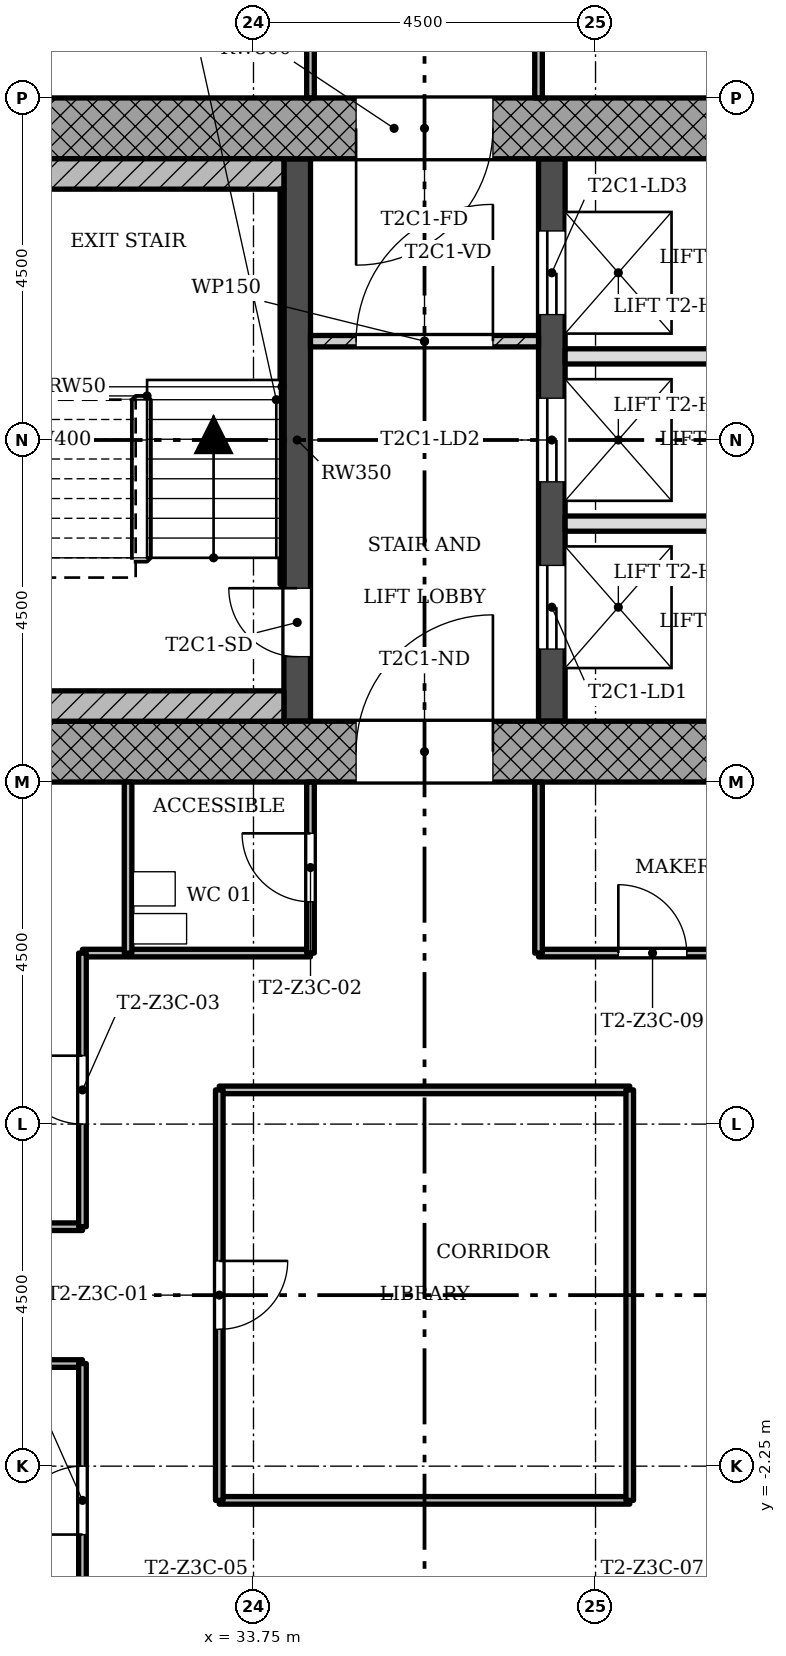
"""IFC4 building model, lengths in metres.
Left out: names, types, materials, properties, quantities, classifications, styles, units other than length and angle.
Written with IfcOpenShell. Run it as: python <this file> out.ifc"""

import sys

from ifc_helpers import new_model, si_unit, direction, frame, frame_2d, origin, place, context, subcontext, project, spatial, rectangle, extrude, element, fill, save


model = new_model("IFC4")
c1 = context("Model", 3, precision=1e-05, world=origin(), true_north=direction((0.0, 1.0)))
c2 = subcontext(c1, "Body", "Model", "MODEL_VIEW")
j1 = project(units=[si_unit("LENGTHUNIT", "METRE"), si_unit("PLANEANGLEUNIT", "RADIAN")], contexts=[c1])
p1 = place(None, origin())
s1 = spatial("IfcSite", under=j1, at=p1, CompositionType="ELEMENT")
p2 = place(p1, origin())
s2 = spatial("IfcBuilding", under=s1, at=p2, CompositionType="ELEMENT")
p3 = place(p2, frame((0.0, 0.0, 154.1)))
s3 = spatial("IfcBuildingStorey", under=s2, at=p3, CompositionType="ELEMENT", Elevation=154.1)
p4 = place(p3, frame((30.05, 7.15, 0.0), z_axis=(0.0, 0.0, 1.0), x_axis=(1.0, 0.0, 0.0)))
e1 = element("IfcWall", 1, at=p4, inside=s3, PredefinedType="SHEAR", context=c2, shape_type="SweptSolid", body=[
    extrude(rectangle(XDim=12.7, YDim=0.8, at=frame_2d((6.35, 0.0))), origin(), (0.0, 0.0, 1.0), 3.4),
])
p5 = place(p4, frame((5.05, 0.0, 0.0)))
e2 = element("IfcOpeningElement", 2, at=p5, cuts=e1, PredefinedType="OPENING", context=c2, shape_type="SweptSolid", body=[
    extrude(rectangle(XDim=1.8, YDim=2.1, at=frame_2d((0.9, 1.05))), frame((0.0, 0.41, 0.0), z_axis=(0.0, -1.0, 0.0), x_axis=(1.0, 0.0, 0.0)), (0.0, 0.0, 1.0), 0.82),
])
p6 = place(p3, frame((41.95, 15.35, 0.0), z_axis=(0.0, 0.0, 1.0), x_axis=(-1.0, 0.0, 0.0)))
e3 = element("IfcWall", 3, at=p6, inside=s3, PredefinedType="SHEAR", context=c2, shape_type="SweptSolid", body=[
    extrude(rectangle(XDim=12.7, YDim=0.8, at=frame_2d((6.35, 0.0))), origin(), (0.0, 0.0, 1.0), 3.4),
])
p7 = place(p6, frame((5.05, 0.0, 0.0)))
e4 = element("IfcOpeningElement", 4, at=p7, cuts=e3, PredefinedType="OPENING", context=c2, shape_type="SweptSolid", body=[
    extrude(rectangle(XDim=1.8, YDim=2.1, at=frame_2d((0.9, 1.05))), frame((0.0, 0.41, 0.0), z_axis=(0.0, -1.0, 0.0), x_axis=(1.0, 0.0, 0.0)), (0.0, 0.0, 1.0), 0.82),
])
p8 = place(p3, frame((34.325, 7.55, 0.0), z_axis=(0.0, 0.0, 1.0), x_axis=(0.0, 1.0, 0.0)))
e5 = element("IfcWall", 5, at=p8, inside=s3, PredefinedType="SHEAR", context=c2, shape_type="SweptSolid", body=[
    extrude(rectangle(XDim=7.4, YDim=0.35, at=frame_2d((3.7, 0.0))), origin(), (0.0, 0.0, 1.0), 3.4),
])
p9 = place(p8, frame((0.85, 0.0, 0.0)))
e6 = element("IfcOpeningElement", 6, at=p9, cuts=e5, PredefinedType="OPENING", context=c2, shape_type="SweptSolid", body=[
    extrude(rectangle(XDim=0.9, YDim=2.1, at=frame_2d((0.45, 1.05))), frame((0.0, 0.185, 0.0), z_axis=(0.0, -1.0, 0.0), x_axis=(1.0, 0.0, 0.0)), (0.0, 0.0, 1.0), 0.37),
])
p10 = place(p3, frame((37.675, 7.55, 0.0), z_axis=(0.0, 0.0, 1.0), x_axis=(0.0, 1.0, 0.0)))
e7 = element("IfcWall", 7, at=p10, inside=s3, PredefinedType="SHEAR", context=c2, shape_type="SweptSolid", body=[
    extrude(rectangle(XDim=7.4, YDim=0.35, at=frame_2d((3.7, 0.0))), origin(), (0.0, 0.0, 1.0), 3.4),
])
p11 = place(p10, frame((0.95, 0.0, 0.0)))
e8 = element("IfcOpeningElement", 8, at=p11, cuts=e7, PredefinedType="OPENING", context=c2, shape_type="SweptSolid", body=[
    extrude(rectangle(XDim=1.1, YDim=2.1, at=frame_2d((0.55, 1.05))), frame((0.0, 0.185, 0.0), z_axis=(0.0, -1.0, 0.0), x_axis=(1.0, 0.0, 0.0)), (0.0, 0.0, 1.0), 0.37),
])
p12 = place(p10, frame((3.15, 0.0, 0.0)))
e9 = element("IfcOpeningElement", 9, at=p12, cuts=e7, PredefinedType="OPENING", context=c2, shape_type="SweptSolid", body=[
    extrude(rectangle(XDim=1.1, YDim=2.1, at=frame_2d((0.55, 1.05))), frame((0.0, 0.185, 0.0), z_axis=(0.0, -1.0, 0.0), x_axis=(1.0, 0.0, 0.0)), (0.0, 0.0, 1.0), 0.37),
])
p13 = place(p10, frame((5.35, 0.0, 0.0)))
e10 = element("IfcOpeningElement", 10, at=p13, cuts=e7, PredefinedType="OPENING", context=c2, shape_type="SweptSolid", body=[
    extrude(rectangle(XDim=1.1, YDim=2.1, at=frame_2d((0.55, 1.05))), frame((0.0, 0.185, 0.0), z_axis=(0.0, -1.0, 0.0), x_axis=(1.0, 0.0, 0.0)), (0.0, 0.0, 1.0), 0.37),
])
p14 = place(p3, frame((37.5, 12.55, 0.0), z_axis=(0.0, 0.0, 1.0), x_axis=(-1.0, 0.0, 0.0)))
e11 = element("IfcWall", 11, at=p14, inside=s3, PredefinedType="PARTITIONING", context=c2, shape_type="SweptSolid", body=[
    extrude(rectangle(XDim=3.0, YDim=0.15, at=frame_2d((1.5, 0.0))), origin(), (0.0, 0.0, 1.0), 3.0),
])
p15 = place(p14, frame((0.6, 0.0, 0.0)))
e12 = element("IfcOpeningElement", 12, at=p15, cuts=e11, PredefinedType="OPENING", context=c2, shape_type="SweptSolid", body=[
    extrude(rectangle(XDim=1.8, YDim=2.1, at=frame_2d((0.9, 1.05))), frame((0.0, 0.085, 0.0), z_axis=(0.0, -1.0, 0.0), x_axis=(1.0, 0.0, 0.0)), (0.0, 0.0, 1.0), 0.17),
])
for number, where, z_axis, x_axis in (
    (13, (41.95, 10.15, 0.0), (0.0, 0.0, 1.0), (-1.0, 0.0, 0.0)),
    (14, (41.95, 12.35, 0.0), (0.0, 0.0, 1.0), (-1.0, 0.0, 0.0)),
):
    element("IfcWall", number, at=place(p3, frame(where, z_axis=z_axis, x_axis=x_axis)), inside=s3, PredefinedType="SOLIDWALL", context=c2, shape_type="SweptSolid", body=[
        extrude(rectangle(XDim=4.1, YDim=0.2, at=frame_2d((2.05, 0.0))), origin(), (0.0, 0.0, 1.0), 3.0),
    ])
p16 = place(p3, frame((38.7, -2.7, 0.0), z_axis=(0.0, 0.0, 1.0), x_axis=(-1.0, 0.0, 0.0)))
e15 = element("IfcWall", 15, at=p16, inside=s3, PredefinedType="PARTITIONING", context=c2, shape_type="SweptSolid", body=[
    extrude(rectangle(XDim=5.4, YDim=0.1, at=frame_2d((2.7, 0.0))), origin(), (0.0, 0.0, 1.0), 3.0),
])
for number, where, z_axis, x_axis in (
    (16, (31.5, -0.9, 0.0), (0.0, 0.0, 1.0), (-1.0, 0.0, 0.0)),
    (17, (31.5, 0.9, 0.0), (0.0, 0.0, 1.0), (-1.0, 0.0, 0.0)),
):
    element("IfcWall", number, at=place(p3, frame(where, z_axis=z_axis, x_axis=x_axis)), inside=s3, PredefinedType="PARTITIONING", context=c2, shape_type="SweptSolid", body=[
        extrude(rectangle(XDim=2.25, YDim=0.1, at=frame_2d((1.125, 0.0))), origin(), (0.0, 0.0, 1.0), 3.0),
    ])
p17 = place(p3, frame((38.7, 2.7, 0.0), z_axis=(0.0, 0.0, 1.0), x_axis=(-1.0, 0.0, 0.0)))
e18 = element("IfcWall", 18, at=p17, inside=s3, PredefinedType="PARTITIONING", context=c2, shape_type="SweptSolid", body=[
    extrude(rectangle(XDim=5.4, YDim=0.1, at=frame_2d((2.7, 0.0))), origin(), (0.0, 0.0, 1.0), 3.0),
])
p18 = place(p3, frame((42.75, 4.5, 0.0), z_axis=(0.0, 0.0, 1.0), x_axis=(-1.0, 0.0, 0.0)))
e19 = element("IfcWall", 19, at=p18, inside=s3, PredefinedType="PARTITIONING", context=c2, shape_type="SweptSolid", body=[
    extrude(rectangle(XDim=5.25, YDim=0.1, at=frame_2d((2.625, 0.0))), origin(), (0.0, 0.0, 1.0), 3.0),
])
p19 = place(p18, frame((3.3, 0.0, 0.0)))
e20 = element("IfcOpeningElement", 20, at=p19, cuts=e19, PredefinedType="OPENING", context=c2, shape_type="SweptSolid", body=[
    extrude(rectangle(XDim=0.9, YDim=2.1, at=frame_2d((0.45, 1.05))), frame((0.0, 0.06, 0.0), z_axis=(0.0, -1.0, 0.0), x_axis=(1.0, 0.0, 0.0)), (0.0, 0.0, 1.0), 0.12),
])
p20 = place(p3, frame((34.5, 4.5, 0.0), z_axis=(0.0, 0.0, 1.0), x_axis=(-1.0, 0.0, 0.0)))
e21 = element("IfcWall", 21, at=p20, inside=s3, PredefinedType="PARTITIONING", context=c2, shape_type="SweptSolid", body=[
    extrude(rectangle(XDim=3.0, YDim=0.1, at=frame_2d((1.5, 0.0))), origin(), (0.0, 0.0, 1.0), 3.0),
])
p21 = place(p3, frame((38.7, -2.7, 0.0), z_axis=(0.0, 0.0, 1.0), x_axis=(0.0, 1.0, 0.0)))
e22 = element("IfcWall", 22, at=p21, inside=s3, PredefinedType="PARTITIONING", context=c2, shape_type="SweptSolid", body=[
    extrude(rectangle(XDim=5.4, YDim=0.1, at=frame_2d((2.7, 0.0))), origin(), (0.0, 0.0, 1.0), 3.0),
])
p22 = place(p3, frame((37.5, 4.5, 0.0), z_axis=(0.0, 0.0, 1.0), x_axis=(0.0, 1.0, 0.0)))
e23 = element("IfcWall", 23, at=p22, inside=s3, PredefinedType="PARTITIONING", context=c2, shape_type="SweptSolid", body=[
    extrude(rectangle(XDim=2.25, YDim=0.1, at=frame_2d((1.125, 0.0))), origin(), (0.0, 0.0, 1.0), 3.0),
])
p23 = place(p3, frame((37.5, 15.75, 0.0), z_axis=(0.0, 0.0, 1.0), x_axis=(0.0, 1.0, 0.0)))
e24 = element("IfcWall", 24, at=p23, inside=s3, PredefinedType="PARTITIONING", context=c2, shape_type="SweptSolid", body=[
    extrude(rectangle(XDim=4.5, YDim=0.1, at=frame_2d((2.25, 0.0))), origin(), (0.0, 0.0, 1.0), 3.0),
])
p24 = place(p23, frame((1.8, 0.0, 0.0)))
e25 = element("IfcOpeningElement", 25, at=p24, cuts=e24, PredefinedType="OPENING", context=c2, shape_type="SweptSolid", body=[
    extrude(rectangle(XDim=0.9, YDim=2.1, at=frame_2d((0.45, 1.05))), frame((0.0, 0.06, 0.0), z_axis=(0.0, -1.0, 0.0), x_axis=(1.0, 0.0, 0.0)), (0.0, 0.0, 1.0), 0.12),
])
p25 = place(p3, frame((34.5, 4.5, 0.0), z_axis=(0.0, 0.0, 1.0), x_axis=(0.0, 1.0, 0.0)))
e26 = element("IfcWall", 26, at=p25, inside=s3, PredefinedType="PARTITIONING", context=c2, shape_type="SweptSolid", body=[
    extrude(rectangle(XDim=2.25, YDim=0.1, at=frame_2d((1.125, 0.0))), origin(), (0.0, 0.0, 1.0), 3.0),
])
p26 = place(p25, frame((0.675, 0.0, 0.0)))
e27 = element("IfcOpeningElement", 27, at=p26, cuts=e26, PredefinedType="OPENING", context=c2, shape_type="SweptSolid", body=[
    extrude(rectangle(XDim=0.9, YDim=2.1, at=frame_2d((0.45, 1.05))), frame((0.0, 0.06, 0.0), z_axis=(0.0, -1.0, 0.0), x_axis=(1.0, 0.0, 0.0)), (0.0, 0.0, 1.0), 0.12),
])
p27 = place(p3, frame((34.5, 15.75, 0.0), z_axis=(0.0, 0.0, 1.0), x_axis=(0.0, 1.0, 0.0)))
e28 = element("IfcWall", 28, at=p27, inside=s3, PredefinedType="PARTITIONING", context=c2, shape_type="SweptSolid", body=[
    extrude(rectangle(XDim=4.5, YDim=0.1, at=frame_2d((2.25, 0.0))), origin(), (0.0, 0.0, 1.0), 3.0),
])
p28 = place(p27, frame((1.8, 0.0, 0.0)))
e29 = element("IfcOpeningElement", 29, at=p28, cuts=e28, PredefinedType="OPENING", context=c2, shape_type="SweptSolid", body=[
    extrude(rectangle(XDim=0.9, YDim=2.1, at=frame_2d((0.45, 1.05))), frame((0.0, 0.06, 0.0), z_axis=(0.0, -1.0, 0.0), x_axis=(1.0, 0.0, 0.0)), (0.0, 0.0, 1.0), 0.12),
])
p29 = place(p3, frame((33.3, -2.7, 0.0), z_axis=(0.0, 0.0, 1.0), x_axis=(0.0, 1.0, 0.0)))
e30 = element("IfcWall", 30, at=p29, inside=s3, PredefinedType="PARTITIONING", context=c2, shape_type="SweptSolid", body=[
    extrude(rectangle(XDim=5.4, YDim=0.1, at=frame_2d((2.7, 0.0))), origin(), (0.0, 0.0, 1.0), 3.0),
])
p30 = place(p29, frame((2.25, 0.0, 0.0)))
e31 = element("IfcOpeningElement", 31, at=p30, cuts=e30, PredefinedType="OPENING", context=c2, shape_type="SweptSolid", body=[
    extrude(rectangle(XDim=0.9, YDim=2.1, at=frame_2d((0.45, 1.05))), frame((0.0, 0.06, 0.0), z_axis=(0.0, -1.0, 0.0), x_axis=(1.0, 0.0, 0.0)), (0.0, 0.0, 1.0), 0.12),
])
p31 = place(p3, frame((32.1, 4.5, 0.0), z_axis=(0.0, 0.0, 1.0), x_axis=(0.0, 1.0, 0.0)))
e32 = element("IfcWall", 32, at=p31, inside=s3, PredefinedType="PARTITIONING", context=c2, shape_type="SweptSolid", body=[
    extrude(rectangle(XDim=2.25, YDim=0.1, at=frame_2d((1.125, 0.0))), origin(), (0.0, 0.0, 1.0), 3.0),
])
p32 = place(p3, frame((31.5, -4.5, 0.0), z_axis=(0.0, 0.0, 1.0), x_axis=(0.0, 1.0, 0.0)))
e33 = element("IfcWall", 33, at=p32, inside=s3, PredefinedType="PARTITIONING", context=c2, shape_type="SweptSolid", body=[
    extrude(rectangle(XDim=3.6, YDim=0.1, at=frame_2d((1.8, 0.0))), origin(), (0.0, 0.0, 1.0), 3.0),
])
p33 = place(p32, frame((1.35, 0.0, 0.0)))
e34 = element("IfcOpeningElement", 34, at=p33, cuts=e33, PredefinedType="OPENING", context=c2, shape_type="SweptSolid", body=[
    extrude(rectangle(XDim=0.9, YDim=2.1, at=frame_2d((0.45, 1.05))), frame((0.0, 0.06, 0.0), z_axis=(0.0, -1.0, 0.0), x_axis=(1.0, 0.0, 0.0)), (0.0, 0.0, 1.0), 0.12),
])
p34 = place(p3, frame((31.5, 0.9, 0.0), z_axis=(0.0, 0.0, 1.0), x_axis=(0.0, 1.0, 0.0)))
e35 = element("IfcWall", 35, at=p34, inside=s3, PredefinedType="PARTITIONING", context=c2, shape_type="SweptSolid", body=[
    extrude(rectangle(XDim=3.6, YDim=0.1, at=frame_2d((1.8, 0.0))), origin(), (0.0, 0.0, 1.0), 3.0),
])
p35 = place(p34, frame((1.35, 0.0, 0.0)))
e36 = element("IfcOpeningElement", 36, at=p35, cuts=e35, PredefinedType="OPENING", context=c2, shape_type="SweptSolid", body=[
    extrude(rectangle(XDim=0.9, YDim=2.1, at=frame_2d((0.45, 1.05))), frame((0.0, 0.06, 0.0), z_axis=(0.0, -1.0, 0.0), x_axis=(1.0, 0.0, 0.0)), (0.0, 0.0, 1.0), 0.12),
])
for number, where, z_axis, x_axis in (
    (37, (34.15, 14.75, 0.0), (0.0, 0.0, 1.0), (-1.0, 0.0, 0.0)),
    (38, (34.15, 7.75, 0.0), (0.0, 0.0, 1.0), (-1.0, 0.0, 0.0)),
):
    element("IfcWall", number, at=place(p3, frame(where, z_axis=z_axis, x_axis=x_axis)), inside=s3, PredefinedType="SHEAR", context=c2, shape_type="SweptSolid", body=[
        extrude(rectangle(XDim=4.1, YDim=0.4, at=frame_2d((2.05, 0.0))), origin(), (0.0, 0.0, 1.0), 3.4),
    ])
p36 = place(p3, frame((34.125, 9.35, 0.0), z_axis=(0.0, 0.0, 1.0), x_axis=(0.0, 1.0, 0.0)))
e39 = element("IfcWall", 39, at=p36, inside=s3, PredefinedType="SHEAR", context=c2, shape_type="SweptSolid", body=[
    extrude(rectangle(XDim=5.2, YDim=0.05, at=frame_2d((2.6, 0.0))), origin(), (0.0, 0.0, 1.0), 3.4),
])
p37 = place(p15, origin())
e40 = element("IfcDoor", 40, at=p37, inside=s3, OperationType="SINGLE_SWING_LEFT", PredefinedType="DOOR", context=c2, shape_type="SweptSolid", body=[
    extrude(rectangle(XDim=1.8, YDim=2.1, at=frame_2d((0.9, 1.05))), frame((0.0, 0.025, 0.0), z_axis=(0.0, -1.0, 0.0), x_axis=(1.0, 0.0, 0.0)), (0.0, 0.0, 1.0), 0.05),
])
fill(e12, e40)
p38 = place(p30, origin())
e41 = element("IfcDoor", 41, at=p38, inside=s3, OperationType="SINGLE_SWING_RIGHT", PredefinedType="DOOR", context=c2, shape_type="SweptSolid", body=[
    extrude(rectangle(XDim=0.9, YDim=2.1, at=frame_2d((0.45, 1.05))), frame((0.0, 0.025, 0.0), z_axis=(0.0, -1.0, 0.0), x_axis=(1.0, 0.0, 0.0)), (0.0, 0.0, 1.0), 0.05),
])
fill(e31, e41)
p39 = place(p26, origin())
e42 = element("IfcDoor", 42, at=p39, inside=s3, OperationType="SINGLE_SWING_LEFT", PredefinedType="DOOR", context=c2, shape_type="SweptSolid", body=[
    extrude(rectangle(XDim=0.9, YDim=2.1, at=frame_2d((0.45, 1.05))), frame((0.0, 0.025, 0.0), z_axis=(0.0, -1.0, 0.0), x_axis=(1.0, 0.0, 0.0)), (0.0, 0.0, 1.0), 0.05),
])
fill(e27, e42)
p40 = place(p35, origin())
e43 = element("IfcDoor", 43, at=p40, inside=s3, OperationType="SINGLE_SWING_LEFT", PredefinedType="DOOR", context=c2, shape_type="SweptSolid", body=[
    extrude(rectangle(XDim=0.9, YDim=2.1, at=frame_2d((0.45, 1.05))), frame((0.0, 0.025, 0.0), z_axis=(0.0, -1.0, 0.0), x_axis=(1.0, 0.0, 0.0)), (0.0, 0.0, 1.0), 0.05),
])
fill(e36, e43)
p41 = place(p33, origin())
e44 = element("IfcDoor", 44, at=p41, inside=s3, OperationType="SINGLE_SWING_RIGHT", PredefinedType="DOOR", context=c2, shape_type="SweptSolid", body=[
    extrude(rectangle(XDim=0.9, YDim=2.1, at=frame_2d((0.45, 1.05))), frame((0.0, 0.025, 0.0), z_axis=(0.0, -1.0, 0.0), x_axis=(1.0, 0.0, 0.0)), (0.0, 0.0, 1.0), 0.05),
])
fill(e34, e44)
p42 = place(p19, origin())
e45 = element("IfcDoor", 45, at=p42, inside=s3, OperationType="SINGLE_SWING_RIGHT", PredefinedType="DOOR", context=c2, shape_type="SweptSolid", body=[
    extrude(rectangle(XDim=0.9, YDim=2.1, at=frame_2d((0.45, 1.05))), frame((0.0, 0.025, 0.0), z_axis=(0.0, -1.0, 0.0), x_axis=(1.0, 0.0, 0.0)), (0.0, 0.0, 1.0), 0.05),
])
fill(e20, e45)
p43 = place(p9, origin())
e46 = element("IfcDoor", 46, at=p43, inside=s3, OperationType="SINGLE_SWING_LEFT", PredefinedType="DOOR", context=c2, shape_type="SweptSolid", body=[
    extrude(rectangle(XDim=0.9, YDim=2.1, at=frame_2d((0.45, 1.05))), frame((0.0, 0.025, 0.0), z_axis=(0.0, -1.0, 0.0), x_axis=(1.0, 0.0, 0.0)), (0.0, 0.0, 1.0), 0.05),
])
fill(e6, e46)
p44 = place(p11, origin())
e47 = element("IfcDoor", 47, at=p44, inside=s3, OperationType="SLIDING_TO_LEFT", PredefinedType="DOOR", context=c2, shape_type="SweptSolid", body=[
    extrude(rectangle(XDim=1.1, YDim=2.1, at=frame_2d((0.55, 1.05))), frame((0.0, 0.025, 0.0), z_axis=(0.0, -1.0, 0.0), x_axis=(1.0, 0.0, 0.0)), (0.0, 0.0, 1.0), 0.05),
])
fill(e8, e47)
p45 = place(p12, origin())
e48 = element("IfcDoor", 48, at=p45, inside=s3, OperationType="SLIDING_TO_LEFT", PredefinedType="DOOR", context=c2, shape_type="SweptSolid", body=[
    extrude(rectangle(XDim=1.1, YDim=2.1, at=frame_2d((0.55, 1.05))), frame((0.0, 0.025, 0.0), z_axis=(0.0, -1.0, 0.0), x_axis=(1.0, 0.0, 0.0)), (0.0, 0.0, 1.0), 0.05),
])
fill(e9, e48)
p46 = place(p13, origin())
e49 = element("IfcDoor", 49, at=p46, inside=s3, OperationType="SLIDING_TO_LEFT", PredefinedType="DOOR", context=c2, shape_type="SweptSolid", body=[
    extrude(rectangle(XDim=1.1, YDim=2.1, at=frame_2d((0.55, 1.05))), frame((0.0, 0.025, 0.0), z_axis=(0.0, -1.0, 0.0), x_axis=(1.0, 0.0, 0.0)), (0.0, 0.0, 1.0), 0.05),
])
fill(e10, e49)
p47 = place(p5, origin())
e50 = element("IfcDoor", 50, at=p47, inside=s3, OperationType="SINGLE_SWING_LEFT", PredefinedType="DOOR", context=c2, shape_type="SweptSolid", body=[
    extrude(rectangle(XDim=1.8, YDim=2.1, at=frame_2d((0.9, 1.05))), frame((0.0, 0.025, 0.0), z_axis=(0.0, -1.0, 0.0), x_axis=(1.0, 0.0, 0.0)), (0.0, 0.0, 1.0), 0.05),
])
fill(e2, e50)
p48 = place(p7, origin())
e51 = element("IfcDoor", 51, at=p48, inside=s3, OperationType="SINGLE_SWING_LEFT", PredefinedType="DOOR", context=c2, shape_type="SweptSolid", body=[
    extrude(rectangle(XDim=1.8, YDim=2.1, at=frame_2d((0.9, 1.05))), frame((0.0, 0.025, 0.0), z_axis=(0.0, -1.0, 0.0), x_axis=(1.0, 0.0, 0.0)), (0.0, 0.0, 1.0), 0.05),
])
fill(e4, e51)
save(model, sys.argv[1])
